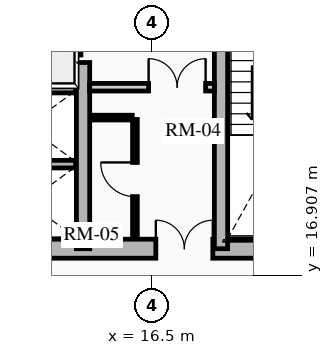
"""IFC4 building model, lengths in metres.
Left out: names, types, materials, properties, quantities, classifications, styles, units other than length and angle.
Written with IfcOpenShell. Run it as: python <this file> out.ifc"""

import sys

from ifc_helpers import new_model, si_unit, direction, frame, frame_2d, origin, place, context, subcontext, project, spatial, rectangle, extrude, source, transform, mapped, element, fill, save


model = new_model("IFC4")
c1 = context("Model", 3, precision=1e-05, world=origin(), true_north=direction((0.0, 1.0)))
c2 = subcontext(c1, "Body", "Model", "MODEL_VIEW")
j1 = project(units=[si_unit("LENGTHUNIT", "METRE"), si_unit("PLANEANGLEUNIT", "RADIAN")], contexts=[c1])
p1 = place(None, origin())
s1 = spatial("IfcSite", under=j1, at=p1, CompositionType="ELEMENT")
p2 = place(p1, origin())
s2 = spatial("IfcBuilding", under=s1, at=p2, CompositionType="ELEMENT")
p3 = place(p2, frame((0.0, 0.0, 62.74)))
s3 = spatial("IfcBuildingStorey", under=s2, at=p3, CompositionType="ELEMENT", Elevation=62.74)
p4 = place(p3, frame((11.15, 17.6, 0.0), z_axis=(0.0, 0.0, 1.0), x_axis=(1.0, 0.0, 0.0)))
e1 = element("IfcWall", 1, at=p4, inside=s3, PredefinedType="SHEAR", context=c2, shape_type="SweptSolid", body=[
    extrude(rectangle(XDim=10.7, YDim=0.5, at=frame_2d((5.35, 0.0))), origin(), (0.0, 0.0, 1.0), 2.91),
])
m1 = source(origin(), c2, "Body", "SweptSolid", [
    extrude(rectangle(XDim=1.5, YDim=2.02, at=frame_2d((0.75, 1.01))), frame((0.0, 0.26, 0.0), z_axis=(0.0, -1.0, 0.0), x_axis=(1.0, 0.0, 0.0)), (0.0, 0.0, 1.0), 0.52),
])
p5 = place(p4, frame((5.45, 0.0, 0.0)))
e2 = element("IfcOpeningElement", 2, at=p5, cuts=e1, PredefinedType="OPENING", context=c2, shape_type="MappedRepresentation", body=[
    mapped(m1, transform((0.0, 0.0, 0.0), x_axis=(1.0, 0.0, 0.0), y_axis=(0.0, 1.0, 0.0), z_axis=(0.0, 0.0, 1.0), scale=1.0)),
])
p6 = place(p3, frame((14.685, 17.6, 0.0), z_axis=(0.0, 0.0, 1.0), x_axis=(0.0, 1.0, 0.0)))
e3 = element("IfcWall", 3, at=p6, inside=s3, PredefinedType="SHEAR", context=c2, shape_type="SweptSolid", body=[
    extrude(rectangle(XDim=13.8, YDim=0.35, at=frame_2d((6.9, 0.0))), origin(), (0.0, 0.0, 1.0), 2.91),
])
m2 = source(origin(), c2, "Body", "SweptSolid", [
    extrude(rectangle(XDim=1.1, YDim=2.015, at=frame_2d((0.55, 1.007))), frame((0.0, 0.185, 0.0), z_axis=(0.0, -1.0, 0.0), x_axis=(1.0, 0.0, 0.0)), (0.0, 0.0, 1.0), 0.37),
])
p7 = place(p6, frame((4.9, 0.0, 0.0)))
e4 = element("IfcOpeningElement", 4, at=p7, cuts=e3, PredefinedType="OPENING", context=c2, shape_type="MappedRepresentation", body=[
    mapped(m2, transform((0.0, 0.0, 0.0), x_axis=(1.0, 0.0, 0.0), y_axis=(0.0, 1.0, 0.0), z_axis=(0.0, 0.0, 1.0), scale=1.0)),
])
m3 = source(origin(), c2, "Body", "SweptSolid", [
    extrude(rectangle(XDim=1.15, YDim=2.02, at=frame_2d((0.575, 1.01))), frame((0.0, 0.185, 0.0), z_axis=(0.0, -1.0, 0.0), x_axis=(1.0, 0.0, 0.0)), (0.0, 0.0, 1.0), 0.37),
])
p8 = place(p6, frame((7.32, 0.0, 0.0)))
e5 = element("IfcOpeningElement", 5, at=p8, cuts=e3, PredefinedType="OPENING", context=c2, shape_type="MappedRepresentation", body=[
    mapped(m3, transform((0.0, 0.0, 0.0), x_axis=(1.0, 0.0, 0.0), y_axis=(0.0, 1.0, 0.0), z_axis=(0.0, 0.0, 1.0), scale=1.0)),
])
p9 = place(p3, frame((18.315, 17.6, 0.0), z_axis=(0.0, 0.0, 1.0), x_axis=(0.0, 1.0, 0.0)))
e6 = element("IfcWall", 6, at=p9, inside=s3, PredefinedType="SHEAR", context=c2, shape_type="SweptSolid", body=[
    extrude(rectangle(XDim=13.8, YDim=0.35, at=frame_2d((6.9, 0.0))), origin(), (0.0, 0.0, 1.0), 2.91),
])
p10 = place(p9, frame((10.025, 0.0, 0.0)))
e7 = element("IfcOpeningElement", 7, at=p10, cuts=e6, PredefinedType="OPENING", context=c2, shape_type="MappedRepresentation", body=[
    mapped(m2, transform((0.0, 0.0, 0.0), x_axis=(1.0, 0.0, 0.0), y_axis=(0.0, 1.0, 0.0), z_axis=(0.0, 0.0, 1.0), scale=1.0)),
])
p11 = place(p9, frame((12.025, 0.0, 0.0)))
e8 = element("IfcOpeningElement", 8, at=p11, cuts=e6, PredefinedType="OPENING", context=c2, shape_type="MappedRepresentation", body=[
    mapped(m2, transform((0.0, 0.0, 0.0), x_axis=(1.0, 0.0, 0.0), y_axis=(0.0, 1.0, 0.0), z_axis=(0.0, 0.0, 1.0), scale=1.0)),
])
p12 = place(p9, frame((5.33, 0.0, 0.0)))
e9 = element("IfcOpeningElement", 9, at=p12, cuts=e6, PredefinedType="OPENING", context=c2, shape_type="MappedRepresentation", body=[
    mapped(m3, transform((0.0, 0.0, 0.0), x_axis=(1.0, 0.0, 0.0), y_axis=(0.0, 1.0, 0.0), z_axis=(0.0, 0.0, 1.0), scale=1.0)),
])
for number, where, z_axis, x_axis in (
    (10, (11.52, 21.8, 0.0), (0.0, 0.0, 1.0), (1.0, 0.0, 0.0)),
    (11, (11.52, 19.825, 0.0), (0.0, 0.0, 1.0), (1.0, 0.0, 0.0)),
):
    element("IfcWall", number, at=place(p3, frame(where, z_axis=z_axis, x_axis=x_axis)), inside=s3, PredefinedType="SHEAR", context=c2, shape_type="SweptSolid", body=[
        extrude(rectangle(XDim=2.97, YDim=0.2, at=frame_2d((1.485, 0.0))), origin(), (0.0, 0.0, 1.0), 2.91),
    ])
p13 = place(p3, frame((14.86, 21.85, 0.0), z_axis=(0.0, 0.0, 1.0), x_axis=(1.0, 0.0, 0.0)))
e12 = element("IfcWall", 12, at=p13, inside=s3, PredefinedType="PARTITIONING", context=c2, shape_type="SweptSolid", body=[
    extrude(rectangle(XDim=3.28, YDim=0.2, at=frame_2d((1.64, 0.0))), origin(), (0.0, 0.0, 1.0), 2.555),
])
m4 = source(origin(), c2, "Body", "SweptSolid", [
    extrude(rectangle(XDim=1.5, YDim=2.02, at=frame_2d((0.75, 1.01))), frame((0.0, 0.11, 0.0), z_axis=(0.0, -1.0, 0.0), x_axis=(1.0, 0.0, 0.0)), (0.0, 0.0, 1.0), 0.22),
])
p14 = place(p13, frame((1.55, 0.0, 0.0)))
e13 = element("IfcOpeningElement", 13, at=p14, cuts=e12, PredefinedType="OPENING", context=c2, shape_type="MappedRepresentation", body=[
    mapped(m4, transform((0.0, 0.0, 0.0), x_axis=(1.0, 0.0, 0.0), y_axis=(0.0, 1.0, 0.0), z_axis=(0.0, 0.0, 1.0), scale=1.0)),
])
p15 = place(p3, frame((16.05, 17.92, 0.0), z_axis=(0.0, 0.0, 1.0), x_axis=(0.0, 1.0, 0.0)))
e14 = element("IfcWall", 14, at=p15, inside=s3, PredefinedType="PARTITIONING", context=c2, shape_type="SweptSolid", body=[
    extrude(rectangle(XDim=3.08, YDim=0.125, at=frame_2d((1.54, 0.0))), origin(), (0.0, 0.0, 1.0), 2.555),
])
m5 = source(origin(), c2, "Body", "SweptSolid", [
    extrude(rectangle(XDim=0.9, YDim=2.005, at=frame_2d((0.45, 1.002))), frame((0.0, 0.073, 0.0), z_axis=(0.0, -1.0, 0.0), x_axis=(1.0, 0.0, 0.0)), (0.0, 0.0, 1.0), 0.145),
])
p16 = place(p15, frame((1.05, 0.0, 0.0)))
e15 = element("IfcOpeningElement", 15, at=p16, cuts=e14, PredefinedType="OPENING", context=c2, shape_type="MappedRepresentation", body=[
    mapped(m5, transform((0.0, 0.0, 0.0), x_axis=(1.0, 0.0, 0.0), y_axis=(0.0, 1.0, 0.0), z_axis=(0.0, 0.0, 1.0), scale=1.0)),
])
p17 = place(p3, frame((14.88, 21.05, 0.0), z_axis=(0.0, 0.0, 1.0), x_axis=(1.0, 0.0, 0.0)))
e16 = element("IfcWall", 16, at=p17, inside=s3, PredefinedType="PARTITIONING", context=c2, shape_type="SweptSolid", body=[
    extrude(rectangle(XDim=1.1, YDim=0.125, at=frame_2d((0.55, 0.0))), origin(), (0.0, 0.0, 1.0), 2.555),
])
m6 = source(origin(), c2, "Body", "SweptSolid", [
    extrude(rectangle(XDim=1.1, YDim=2.015, at=frame_2d((0.55, 1.007))), frame((0.0, 0.025, 0.0), z_axis=(0.0, -1.0, 0.0), x_axis=(1.0, 0.0, 0.0)), (0.0, 0.0, 1.0), 0.05),
])
p18 = place(p7, origin())
e17 = element("IfcDoor", 17, at=p18, inside=s3, OperationType="SLIDING_TO_RIGHT", PredefinedType="DOOR", context=c2, shape_type="MappedRepresentation", body=[
    mapped(m6, transform((0.0, 0.0, 0.0), x_axis=(1.0, 0.0, 0.0), y_axis=(0.0, 1.0, 0.0), z_axis=(0.0, 0.0, 1.0), scale=1.0)),
])
fill(e4, e17)
m7 = source(origin(), c2, "Body", "SweptSolid", [
    extrude(rectangle(XDim=1.5, YDim=2.02, at=frame_2d((0.75, 1.01))), frame((0.0, 0.025, 0.0), z_axis=(0.0, -1.0, 0.0), x_axis=(1.0, 0.0, 0.0)), (0.0, 0.0, 1.0), 0.05),
])
p19 = place(p5, origin())
e18 = element("IfcDoor", 18, at=p19, inside=s3, OperationType="DOUBLE_DOOR_SINGLE_SWING", PredefinedType="DOOR", context=c2, shape_type="MappedRepresentation", body=[
    mapped(m7, transform((0.0, 0.0, 0.0), x_axis=(1.0, 0.0, 0.0), y_axis=(0.0, 1.0, 0.0), z_axis=(0.0, 0.0, 1.0), scale=1.0)),
])
fill(e2, e18)
p20 = place(p14, origin())
e19 = element("IfcDoor", 19, at=p20, inside=s3, OperationType="DOUBLE_DOOR_SINGLE_SWING", PredefinedType="DOOR", context=c2, shape_type="MappedRepresentation", body=[
    mapped(m7, transform((0.0, 0.0, 0.0), x_axis=(1.0, 0.0, 0.0), y_axis=(0.0, 1.0, 0.0), z_axis=(0.0, 0.0, 1.0), scale=1.0)),
])
fill(e13, e19)
m8 = source(origin(), c2, "Body", "SweptSolid", [
    extrude(rectangle(XDim=0.9, YDim=2.005, at=frame_2d((0.45, 1.002))), frame((0.0, 0.025, 0.0), z_axis=(0.0, -1.0, 0.0), x_axis=(1.0, 0.0, 0.0)), (0.0, 0.0, 1.0), 0.05),
])
p21 = place(p16, origin())
e20 = element("IfcDoor", 20, at=p21, inside=s3, OperationType="SINGLE_SWING_RIGHT", PredefinedType="DOOR", context=c2, shape_type="MappedRepresentation", body=[
    mapped(m8, transform((0.0, 0.0, 0.0), x_axis=(1.0, 0.0, 0.0), y_axis=(0.0, 1.0, 0.0), z_axis=(0.0, 0.0, 1.0), scale=1.0)),
])
fill(e15, e20)
save(model, sys.argv[1])
